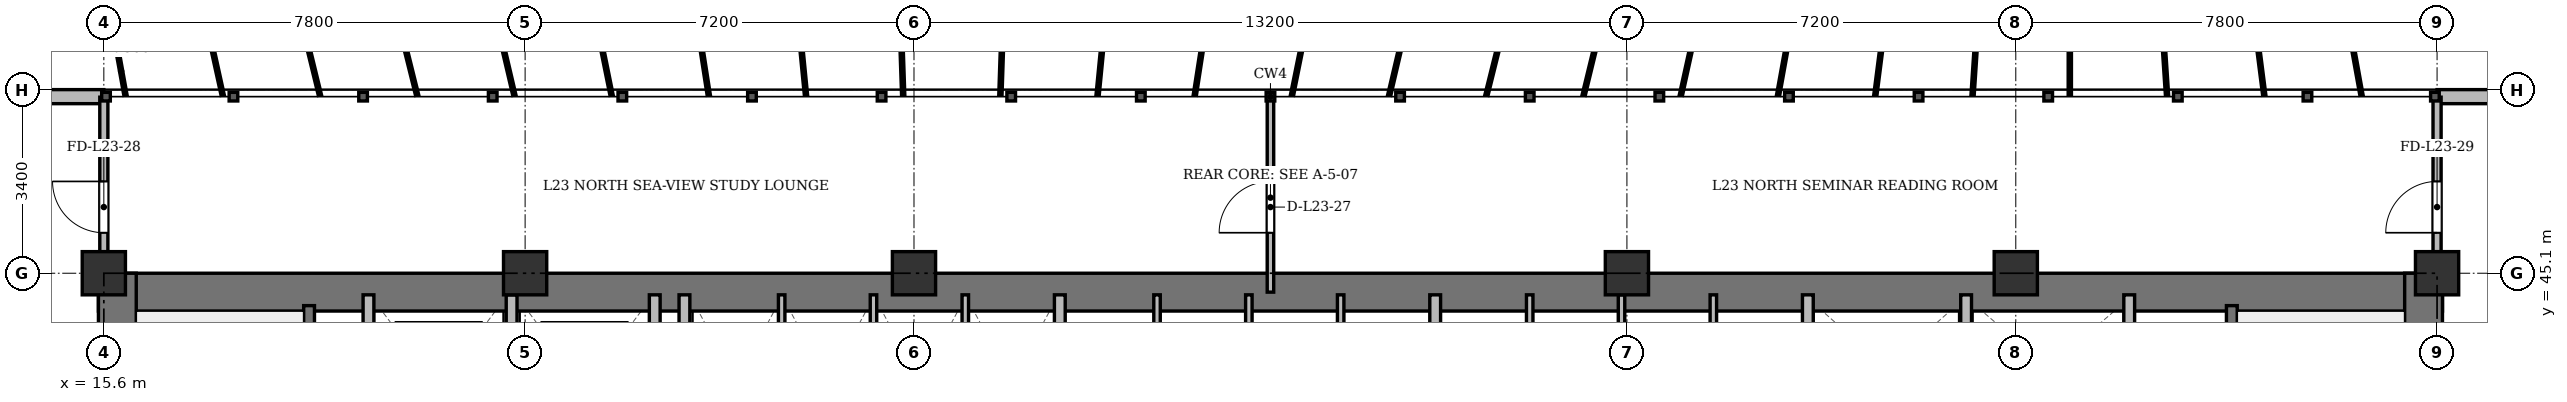
"""IFC4 building model, lengths in metres.
Left out: names, types, materials, properties, quantities, classifications, styles, units other than length and angle.
Written with IfcOpenShell. Run it as: python <this file> out.ifc"""

import sys

from ifc_helpers import new_model, si_unit, direction, frame, frame_2d, origin, origin_2d, place, context, subcontext, project, spatial, rectangle, extrude, source, transform, mapped, element, fill, save


model = new_model("IFC4")
c1 = context("Model", 3, precision=1e-05, world=origin(), true_north=direction((0.0, 1.0)))
c2 = subcontext(c1, "Body", "Model", "MODEL_VIEW")
j1 = project(units=[si_unit("LENGTHUNIT", "METRE"), si_unit("PLANEANGLEUNIT", "RADIAN")], contexts=[c1])
p1 = place(None, origin())
s1 = spatial("IfcSite", under=j1, at=p1, CompositionType="ELEMENT")
p2 = place(p1, origin())
s2 = spatial("IfcBuilding", under=s1, at=p2, CompositionType="ELEMENT")
p3 = place(p2, frame((0.0, 0.0, 92.5)))
s3 = spatial("IfcBuildingStorey", under=s2, at=p3, CompositionType="ELEMENT", Elevation=92.5)
m1 = source(origin(), c2, "Body", "SweptSolid", [
    extrude(rectangle(XDim=0.8, YDim=0.8, at=origin_2d()), origin(), (0.0, 0.0, 1.0), 3.6),
])
for number, where, z_axis, x_axis in (
    (1, (15.6, 45.1, 0.0), (0.0, 0.0, 1.0), (1.0, 0.0, 0.0)),
    (2, (23.4, 45.1, 0.0), (0.0, 0.0, 1.0), (1.0, 0.0, 0.0)),
    (3, (30.6, 45.1, 0.0), (0.0, 0.0, 1.0), (1.0, 0.0, 0.0)),
    (4, (43.8, 45.1, 0.0), (0.0, 0.0, 1.0), (1.0, 0.0, 0.0)),
    (5, (51.0, 45.1, 0.0), (0.0, 0.0, 1.0), (1.0, 0.0, 0.0)),
    (6, (58.8, 45.1, 0.0), (0.0, 0.0, 1.0), (1.0, 0.0, 0.0)),
):
    element("IfcColumn", number, at=place(p3, frame(where, z_axis=z_axis, x_axis=x_axis)), inside=s3, PredefinedType="COLUMN", context=c2, shape_type="MappedRepresentation", body=[
        mapped(m1, transform((0.0, 0.0, 0.0), x_axis=(1.0, 0.0, 0.0), y_axis=(0.0, 1.0, 0.0), z_axis=(0.0, 0.0, 1.0), scale=1.0)),
    ])
p4 = place(p3, frame((7.6, 48.37, 0.0), z_axis=(0.0, 0.0, 1.0), x_axis=(1.0, 0.0, 0.0)))
e7 = element("IfcWall", 7, at=p4, inside=s3, PredefinedType="SOLIDWALL", context=c2, shape_type="SweptSolid", body=[
    extrude(rectangle(XDim=8.0, YDim=0.26, at=frame_2d((4.0, 0.0))), origin(), (0.0, 0.0, 1.0), 3.34),
])
p5 = place(p4, frame((0.768, 0.0, 0.9)))
e8 = element("IfcOpeningElement", 8, at=p5, cuts=e7, PredefinedType="OPENING", context=c2, shape_type="SweptSolid", body=[
    extrude(rectangle(XDim=1.2, YDim=1.65, at=frame_2d((0.6, 0.825))), frame((0.0, 0.14, 0.0), z_axis=(0.0, -1.0, 0.0), x_axis=(1.0, 0.0, 0.0)), (0.0, 0.0, 1.0), 0.28),
])
p6 = place(p4, frame((4.441, 0.0, 0.9)))
e9 = element("IfcOpeningElement", 9, at=p6, cuts=e7, PredefinedType="OPENING", context=c2, shape_type="SweptSolid", body=[
    extrude(rectangle(XDim=1.35, YDim=1.5, at=frame_2d((0.675, 0.75))), frame((0.0, 0.14, 0.0), z_axis=(0.0, -1.0, 0.0), x_axis=(1.0, 0.0, 0.0)), (0.0, 0.0, 1.0), 0.28),
])
p7 = place(p3, frame((58.8, 48.37, 0.0), z_axis=(0.0, 0.0, 1.0), x_axis=(1.0, 0.0, 0.0)))
e10 = element("IfcWall", 10, at=p7, inside=s3, PredefinedType="SOLIDWALL", context=c2, shape_type="SweptSolid", body=[
    extrude(rectangle(XDim=8.0, YDim=0.26, at=frame_2d((4.0, 0.0))), origin(), (0.0, 0.0, 1.0), 3.34),
])
p8 = place(p7, frame((3.325, 0.0, 0.9)))
e11 = element("IfcOpeningElement", 11, at=p8, cuts=e10, PredefinedType="OPENING", context=c2, shape_type="SweptSolid", body=[
    extrude(rectangle(XDim=1.35, YDim=1.5, at=frame_2d((0.675, 0.75))), frame((0.0, 0.14, 0.0), z_axis=(0.0, -1.0, 0.0), x_axis=(1.0, 0.0, 0.0)), (0.0, 0.0, 1.0), 0.28),
])
p9 = place(p3, frame((15.5, 44.75, 0.0), z_axis=(0.0, 0.0, 1.0), x_axis=(1.0, 0.0, 0.0)))
e12 = element("IfcWall", 12, at=p9, inside=s3, PredefinedType="SHEAR", context=c2, shape_type="SweptSolid", body=[
    extrude(rectangle(XDim=43.4, YDim=0.7, at=frame_2d((21.7, 0.0))), origin(), (0.0, 0.0, 1.0), 3.34),
])
for number, where, z_axis, x_axis in (
    (13, (15.85, 33.4, 0.0), (0.0, 0.0, 1.0), (0.0, 1.0, 0.0)),
    (14, (58.55, 33.4, 0.0), (0.0, 0.0, 1.0), (0.0, 1.0, 0.0)),
):
    element("IfcWall", number, at=place(p3, frame(where, z_axis=z_axis, x_axis=x_axis)), inside=s3, PredefinedType="SHEAR", context=c2, shape_type="SweptSolid", body=[
        extrude(rectangle(XDim=11.7, YDim=0.7, at=frame_2d((5.85, 0.0))), origin(), (0.0, 0.0, 1.0), 3.34),
    ])
p10 = place(p3, frame((19.4, 33.4, 0.0), z_axis=(0.0, 0.0, 1.0), x_axis=(0.0, 1.0, 0.0)))
e15 = element("IfcWall", 15, at=p10, inside=s3, PredefinedType="SHEAR", context=c2, shape_type="SweptSolid", body=[
    extrude(rectangle(XDim=11.1, YDim=0.2, at=frame_2d((5.55, 0.0))), origin(), (0.0, 0.0, 1.0), 3.34),
])
p11 = place(p10, frame((0.85, 0.0, 0.0)))
e16 = element("IfcOpeningElement", 16, at=p11, cuts=e15, PredefinedType="OPENING", context=c2, shape_type="SweptSolid", body=[
    extrude(rectangle(XDim=1.1, YDim=2.15, at=frame_2d((0.55, 1.075))), frame((0.0, 0.11, 0.0), z_axis=(0.0, -1.0, 0.0), x_axis=(1.0, 0.0, 0.0)), (0.0, 0.0, 1.0), 0.22),
])
p12 = place(p3, frame((55.0, 33.4, 0.0), z_axis=(0.0, 0.0, 1.0), x_axis=(0.0, 1.0, 0.0)))
e17 = element("IfcWall", 17, at=p12, inside=s3, PredefinedType="SHEAR", context=c2, shape_type="SweptSolid", body=[
    extrude(rectangle(XDim=11.1, YDim=0.2, at=frame_2d((5.55, 0.0))), origin(), (0.0, 0.0, 1.0), 3.34),
])
p13 = place(p12, frame((0.85, 0.0, 0.0)))
e18 = element("IfcOpeningElement", 18, at=p13, cuts=e17, PredefinedType="OPENING", context=c2, shape_type="SweptSolid", body=[
    extrude(rectangle(XDim=1.1, YDim=2.15, at=frame_2d((0.55, 1.075))), frame((0.0, 0.11, 0.0), z_axis=(0.0, -1.0, 0.0), x_axis=(1.0, 0.0, 0.0)), (0.0, 0.0, 1.0), 0.22),
])
for number, where, z_axis, x_axis in (
    (19, (20.5, 41.3, 0.0), (0.0, 0.0, 1.0), (0.0, 1.0, 0.0)),
    (20, (23.15, 41.3, 0.0), (0.0, 0.0, 1.0), (0.0, 1.0, 0.0)),
    (21, (25.8, 41.3, 0.0), (0.0, 0.0, 1.0), (0.0, 1.0, 0.0)),
):
    element("IfcWall", number, at=place(p3, frame(where, z_axis=z_axis, x_axis=x_axis)), inside=s3, PredefinedType="SOLIDWALL", context=c2, shape_type="SweptSolid", body=[
        extrude(rectangle(XDim=3.4, YDim=0.2, at=frame_2d((1.7, 0.0))), origin(), (0.0, 0.0, 1.0), 3.34),
    ])
p14 = place(p3, frame((26.35, 33.4, 0.0), z_axis=(0.0, 0.0, 1.0), x_axis=(0.0, 1.0, 0.0)))
e22 = element("IfcWall", 22, at=p14, inside=s3, PredefinedType="SOLIDWALL", context=c2, shape_type="SweptSolid", body=[
    extrude(rectangle(XDim=11.3, YDim=0.2, at=frame_2d((5.65, 0.0))), origin(), (0.0, 0.0, 1.0), 2.752),
])
p15 = place(p3, frame((33.3, 41.5, 0.0), z_axis=(0.0, 0.0, 1.0), x_axis=(0.0, 1.0, 0.0)))
e23 = element("IfcWall", 23, at=p15, inside=s3, PredefinedType="SOLIDWALL", context=c2, shape_type="SweptSolid", body=[
    extrude(rectangle(XDim=3.2, YDim=0.2, at=frame_2d((1.6, 0.0))), origin(), (0.0, 0.0, 1.0), 3.34),
])
for number, where, z_axis, x_axis in (
    (24, (28.15, 41.5, 0.0), (0.0, 0.0, 1.0), (0.0, 1.0, 0.0)),
    (25, (29.85, 41.5, 0.0), (0.0, 0.0, 1.0), (0.0, 1.0, 0.0)),
    (26, (31.55, 41.5, 0.0), (0.0, 0.0, 1.0), (0.0, 1.0, 0.0)),
    (27, (35.1, 41.5, 0.0), (0.0, 0.0, 1.0), (0.0, 1.0, 0.0)),
    (28, (36.8, 41.5, 0.0), (0.0, 0.0, 1.0), (0.0, 1.0, 0.0)),
    (29, (38.5, 41.5, 0.0), (0.0, 0.0, 1.0), (0.0, 1.0, 0.0)),
):
    element("IfcWall", number, at=place(p3, frame(where, z_axis=z_axis, x_axis=x_axis)), inside=s3, PredefinedType="PARTITIONING", context=c2, shape_type="SweptSolid", body=[
        extrude(rectangle(XDim=3.2, YDim=0.12, at=frame_2d((1.6, 0.0))), origin(), (0.0, 0.0, 1.0), 3.34),
    ])
p16 = place(p3, frame((40.25, 41.5, 0.0), z_axis=(0.0, 0.0, 1.0), x_axis=(0.0, 1.0, 0.0)))
e30 = element("IfcWall", 30, at=p16, inside=s3, PredefinedType="SOLIDWALL", context=c2, shape_type="SweptSolid", body=[
    extrude(rectangle(XDim=3.2, YDim=0.2, at=frame_2d((1.6, 0.0))), origin(), (0.0, 0.0, 1.0), 3.34),
])
p17 = place(p3, frame((42.0, 41.5, 0.0), z_axis=(0.0, 0.0, 1.0), x_axis=(0.0, 1.0, 0.0)))
e31 = element("IfcWall", 31, at=p17, inside=s3, PredefinedType="PARTITIONING", context=c2, shape_type="SweptSolid", body=[
    extrude(rectangle(XDim=3.2, YDim=0.12, at=frame_2d((1.6, 0.0))), origin(), (0.0, 0.0, 1.0), 3.34),
])
p18 = place(p3, frame((43.7, 41.5, 0.0), z_axis=(0.0, 0.0, 1.0), x_axis=(0.0, 1.0, 0.0)))
e32 = element("IfcWall", 32, at=p18, inside=s3, PredefinedType="PARTITIONING", context=c2, shape_type="SweptSolid", body=[
    extrude(rectangle(XDim=3.2, YDim=0.12, at=frame_2d((1.6, 0.0))), origin(), (0.0, 0.0, 1.0), 2.84),
])
p19 = place(p3, frame((45.4, 41.5, 0.0), z_axis=(0.0, 0.0, 1.0), x_axis=(0.0, 1.0, 0.0)))
e33 = element("IfcWall", 33, at=p19, inside=s3, PredefinedType="PARTITIONING", context=c2, shape_type="SweptSolid", body=[
    extrude(rectangle(XDim=3.2, YDim=0.12, at=frame_2d((1.6, 0.0))), origin(), (0.0, 0.0, 1.0), 3.34),
])
p20 = place(p3, frame((47.15, 33.4, 0.0), z_axis=(0.0, 0.0, 1.0), x_axis=(0.0, 1.0, 0.0)))
e34 = element("IfcWall", 34, at=p20, inside=s3, PredefinedType="SOLIDWALL", context=c2, shape_type="SweptSolid", body=[
    extrude(rectangle(XDim=11.3, YDim=0.2, at=frame_2d((5.65, 0.0))), origin(), (0.0, 0.0, 1.0), 2.752),
])
for number, where, z_axis, x_axis in (
    (35, (50.08, 42.05, 0.0), (0.0, 0.0, 1.0), (0.0, 1.0, 0.0)),
    (36, (53.1, 42.05, 0.0), (0.0, 0.0, 1.0), (0.0, 1.0, 0.0)),
):
    element("IfcWall", number, at=place(p3, frame(where, z_axis=z_axis, x_axis=x_axis)), inside=s3, PredefinedType="SOLIDWALL", context=c2, shape_type="SweptSolid", body=[
        extrude(rectangle(XDim=2.65, YDim=0.2, at=frame_2d((1.325, 0.0))), origin(), (0.0, 0.0, 1.0), 3.34),
    ])
p21 = place(p3, frame((37.2, 44.75, 0.0), z_axis=(0.0, 0.0, 1.0), x_axis=(0.0, 1.0, 0.0)))
e37 = element("IfcWall", 37, at=p21, inside=s3, PredefinedType="PARTITIONING", context=c2, shape_type="SweptSolid", body=[
    extrude(rectangle(XDim=3.61, YDim=0.12, at=frame_2d((1.805, 0.0))), origin(), (0.0, 0.0, 1.0), 2.752),
])
p22 = place(p21, frame((1.1, 0.0, 0.0)))
e38 = element("IfcOpeningElement", 38, at=p22, cuts=e37, PredefinedType="OPENING", context=c2, shape_type="SweptSolid", body=[
    extrude(rectangle(XDim=0.95, YDim=2.15, at=frame_2d((0.475, 1.075))), frame((0.0, 0.07, 0.0), z_axis=(0.0, -1.0, 0.0), x_axis=(1.0, 0.0, 0.0)), (0.0, 0.0, 1.0), 0.14),
])
p23 = place(p3, frame((15.6, 44.75, 0.0), z_axis=(0.0, 0.0, 1.0), x_axis=(0.0, 1.0, 0.0)))
e39 = element("IfcWall", 39, at=p23, inside=s3, PredefinedType="PARTITIONING", context=c2, shape_type="SweptSolid", body=[
    extrude(rectangle(XDim=3.61, YDim=0.15, at=frame_2d((1.805, 0.0))), origin(), (0.0, 0.0, 1.0), 2.84),
])
p24 = place(p23, frame((1.1, 0.0, 0.0)))
e40 = element("IfcOpeningElement", 40, at=p24, cuts=e39, PredefinedType="OPENING", context=c2, shape_type="SweptSolid", body=[
    extrude(rectangle(XDim=0.95, YDim=2.15, at=frame_2d((0.475, 1.075))), frame((0.0, 0.085, 0.0), z_axis=(0.0, -1.0, 0.0), x_axis=(1.0, 0.0, 0.0)), (0.0, 0.0, 1.0), 0.17),
])
p25 = place(p3, frame((58.8, 44.75, 0.0), z_axis=(0.0, 0.0, 1.0), x_axis=(0.0, 1.0, 0.0)))
e41 = element("IfcWall", 41, at=p25, inside=s3, PredefinedType="PARTITIONING", context=c2, shape_type="SweptSolid", body=[
    extrude(rectangle(XDim=3.61, YDim=0.15, at=frame_2d((1.805, 0.0))), origin(), (0.0, 0.0, 1.0), 2.84),
])
p26 = place(p25, frame((1.1, 0.0, 0.0)))
e42 = element("IfcOpeningElement", 42, at=p26, cuts=e41, PredefinedType="OPENING", context=c2, shape_type="SweptSolid", body=[
    extrude(rectangle(XDim=0.95, YDim=2.15, at=frame_2d((0.475, 1.075))), frame((0.0, 0.085, 0.0), z_axis=(0.0, -1.0, 0.0), x_axis=(1.0, 0.0, 0.0)), (0.0, 0.0, 1.0), 0.17),
])
m2 = source(origin(), c2, "Body", "SweptSolid", [
    extrude(rectangle(XDim=0.95, YDim=2.15, at=frame_2d((0.475, 1.075))), frame((0.0, 0.025, 0.0), z_axis=(0.0, -1.0, 0.0), x_axis=(1.0, 0.0, 0.0)), (0.0, 0.0, 1.0), 0.05),
])
p27 = place(p22, origin())
e43 = element("IfcDoor", 43, at=p27, inside=s3, OperationType="SINGLE_SWING_LEFT", PredefinedType="DOOR", context=c2, shape_type="MappedRepresentation", body=[
    mapped(m2, transform((0.0, 0.0, 0.0), x_axis=(1.0, 0.0, 0.0), y_axis=(0.0, 1.0, 0.0), z_axis=(0.0, 0.0, 1.0), scale=1.0)),
])
fill(e38, e43)
p28 = place(p24, origin())
e44 = element("IfcDoor", 44, at=p28, inside=s3, OperationType="SINGLE_SWING_RIGHT", PredefinedType="DOOR", context=c2, shape_type="MappedRepresentation", body=[
    mapped(m2, transform((0.0, 0.0, 0.0), x_axis=(1.0, 0.0, 0.0), y_axis=(0.0, 1.0, 0.0), z_axis=(0.0, 0.0, 1.0), scale=1.0)),
])
fill(e40, e44)
p29 = place(p26, origin())
e45 = element("IfcDoor", 45, at=p29, inside=s3, OperationType="SINGLE_SWING_LEFT", PredefinedType="DOOR", context=c2, shape_type="MappedRepresentation", body=[
    mapped(m2, transform((0.0, 0.0, 0.0), x_axis=(1.0, 0.0, 0.0), y_axis=(0.0, 1.0, 0.0), z_axis=(0.0, 0.0, 1.0), scale=1.0)),
])
fill(e42, e45)
save(model, sys.argv[1])
